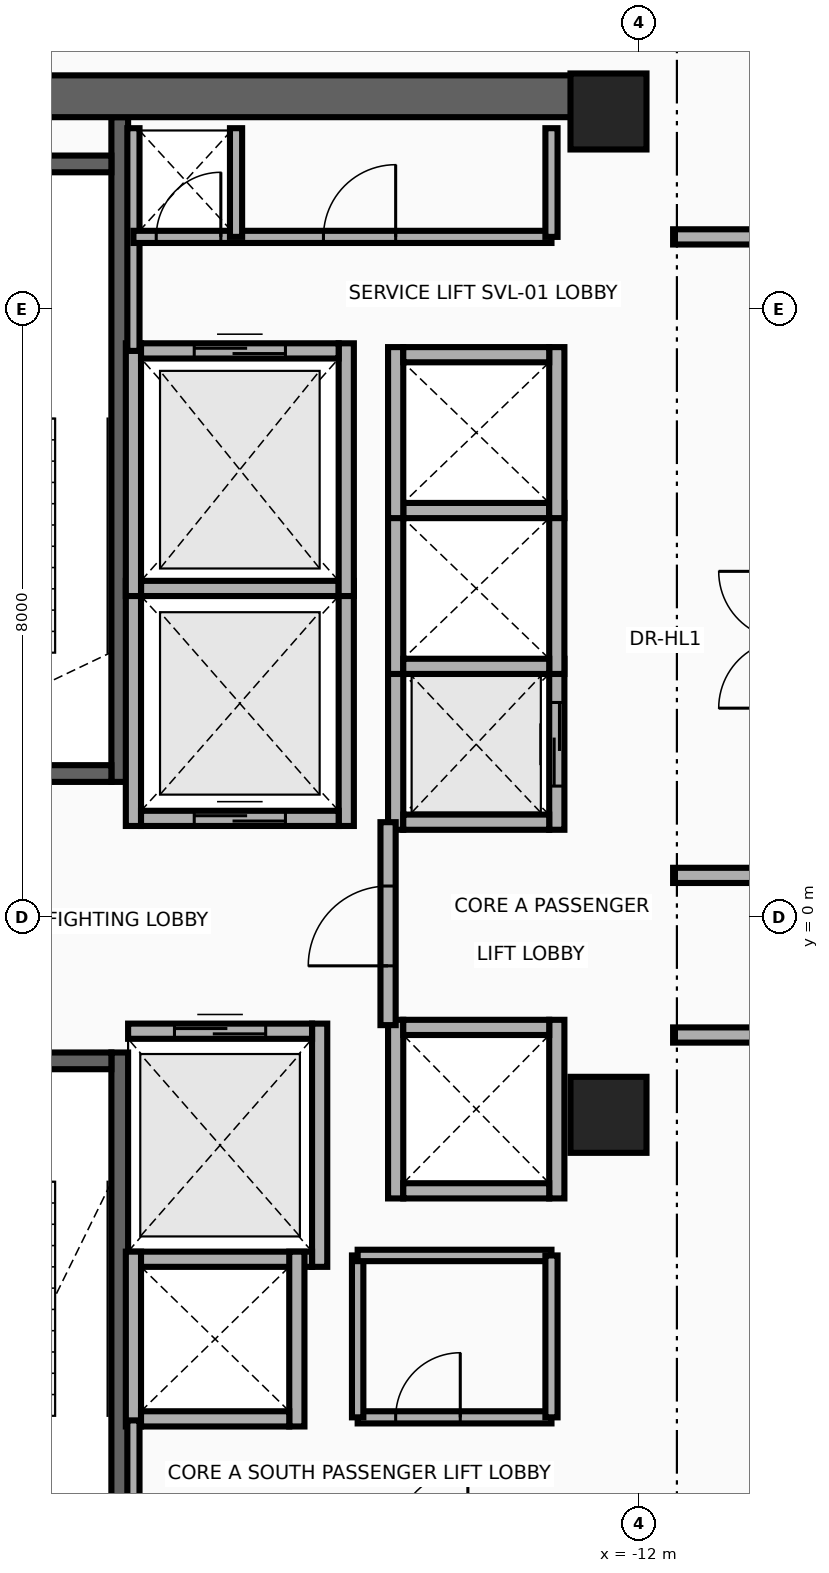
"""IFC4 building model, lengths in metres.
Left out: names, types, materials, properties, quantities, classifications, styles, units other than length and angle.
Written with IfcOpenShell. Run it as: python <this file> out.ifc"""

import sys

from ifc_helpers import new_model, si_unit, direction, frame, frame_2d, origin, origin_2d, place, context, subcontext, project, spatial, rectangle, extrude, source, transform, mapped, element, fill, save


model = new_model("IFC4")
c1 = context("Model", 3, precision=1e-05, world=origin(), true_north=direction((0.0, 1.0)))
c2 = subcontext(c1, "Body", "Model", "MODEL_VIEW")
j1 = project(units=[si_unit("LENGTHUNIT", "METRE"), si_unit("PLANEANGLEUNIT", "RADIAN")], contexts=[c1])
p1 = place(None, origin())
s1 = spatial("IfcSite", under=j1, at=p1, CompositionType="ELEMENT")
p2 = place(p1, origin())
s2 = spatial("IfcBuilding", under=s1, at=p2, CompositionType="ELEMENT")
p3 = place(p2, frame((0.0, 0.0, 172.3)))
s3 = spatial("IfcBuildingStorey", under=s2, at=p3, CompositionType="ELEMENT", Elevation=172.3)
p4 = place(p3, frame((-18.83, 1.78, 0.0), z_axis=(0.0, 0.0, 1.0), x_axis=(0.0, 1.0, 0.0)))
e1 = element("IfcWall", 1, at=p4, inside=s3, PredefinedType="SHEAR", context=c2, shape_type="SweptSolid", body=[
    extrude(rectangle(XDim=8.745, YDim=0.22, at=frame_2d((4.373, 0.0))), origin(), (0.0, 0.0, 1.0), 3.93),
])
p5 = place(p3, frame((-22.05, 1.89, 0.0), z_axis=(0.0, 0.0, 1.0), x_axis=(1.0, 0.0, 0.0)))
e2 = element("IfcWall", 2, at=p5, inside=s3, PredefinedType="SHEAR", context=c2, shape_type="SweptSolid", body=[
    extrude(rectangle(XDim=3.11, YDim=0.22, at=frame_2d((1.555, 0.0))), origin(), (0.0, 0.0, 1.0), 3.93),
])
p6 = place(p5, frame((1.0, 0.0, 0.0)))
e3 = element("IfcOpeningElement", 3, at=p6, cuts=e2, PredefinedType="OPENING", context=c2, shape_type="SweptSolid", body=[
    extrude(rectangle(XDim=1.1, YDim=2.15, at=frame_2d((0.55, 1.075))), frame((0.0, 0.125, 0.0), z_axis=(0.0, -1.0, 0.0), x_axis=(1.0, 0.0, 0.0)), (0.0, 0.0, 1.0), 0.25),
])
p7 = place(p3, frame((-22.05, 9.91, 0.0), z_axis=(0.0, 0.0, 1.0), x_axis=(1.0, 0.0, 0.0)))
e4 = element("IfcWall", 4, at=p7, inside=s3, PredefinedType="SHEAR", context=c2, shape_type="SweptSolid", body=[
    extrude(rectangle(XDim=3.11, YDim=0.22, at=frame_2d((1.555, 0.0))), origin(), (0.0, 0.0, 1.0), 3.93),
])
p8 = place(p3, frame((-18.83, -10.525, 0.0), z_axis=(0.0, 0.0, 1.0), x_axis=(0.0, 1.0, 0.0)))
e5 = element("IfcWall", 5, at=p8, inside=s3, PredefinedType="SHEAR", context=c2, shape_type="SweptSolid", body=[
    extrude(rectangle(XDim=8.745, YDim=0.22, at=frame_2d((4.373, 0.0))), origin(), (0.0, 0.0, 1.0), 3.93),
])
p9 = place(p3, frame((-22.05, -1.89, 0.0), z_axis=(0.0, 0.0, 1.0), x_axis=(1.0, 0.0, 0.0)))
e6 = element("IfcWall", 6, at=p9, inside=s3, PredefinedType="SHEAR", context=c2, shape_type="SweptSolid", body=[
    extrude(rectangle(XDim=3.11, YDim=0.22, at=frame_2d((1.555, 0.0))), origin(), (0.0, 0.0, 1.0), 3.93),
])
p10 = place(p9, frame((1.0, 0.0, 0.0)))
e7 = element("IfcOpeningElement", 7, at=p10, cuts=e6, PredefinedType="OPENING", context=c2, shape_type="SweptSolid", body=[
    extrude(rectangle(XDim=1.1, YDim=2.15, at=frame_2d((0.55, 1.075))), frame((0.0, 0.125, 0.0), z_axis=(0.0, -1.0, 0.0), x_axis=(1.0, 0.0, 0.0)), (0.0, 0.0, 1.0), 0.25),
])
p11 = place(p3, frame((-22.65, 10.8, 0.0), z_axis=(0.0, 0.0, 1.0), x_axis=(1.0, 0.0, 0.0)))
e8 = element("IfcWall", 8, at=p11, inside=s3, PredefinedType="SHEAR", context=c2, shape_type="SweptSolid", body=[
    extrude(rectangle(XDim=10.25, YDim=0.55, at=frame_2d((5.125, 0.0))), origin(), (0.0, 0.0, 1.0), 3.93),
])
m1 = source(origin(), c2, "Body", "SweptSolid", [
    extrude(rectangle(XDim=1.0, YDim=1.0, at=origin_2d()), origin(), (0.0, 0.0, 1.0), 4.25),
])
for number, where, z_axis, x_axis in (
    (9, (-12.4, -2.6, 0.0), (0.0, 0.0, 1.0), (1.0, 0.0, 0.0)),
    (10, (-12.4, 10.6, 0.0), (0.0, 0.0, 1.0), (1.0, 0.0, 0.0)),
):
    element("IfcColumn", number, at=place(p3, frame(where, z_axis=z_axis, x_axis=x_axis)), inside=s3, PredefinedType="COLUMN", context=c2, shape_type="MappedRepresentation", body=[
        mapped(m1, transform((0.0, 0.0, 0.0), x_axis=(1.0, 0.0, 0.0), y_axis=(0.0, 1.0, 0.0), z_axis=(0.0, 0.0, 1.0), scale=1.0)),
    ])
for number, where, z_axis, x_axis in (
    (11, (-18.65, 1.2, 0.0), (0.0, 0.0, 1.0), (0.0, 1.0, 0.0)),
    (12, (-15.85, 1.2, 0.0), (0.0, 0.0, 1.0), (0.0, 1.0, 0.0)),
):
    element("IfcWall", number, at=place(p3, frame(where, z_axis=z_axis, x_axis=x_axis)), inside=s3, PredefinedType="MOVABLE", context=c2, shape_type="SweptSolid", body=[
        extrude(rectangle(XDim=3.225, YDim=0.2, at=frame_2d((1.613, 0.0))), origin(), (0.0, 0.0, 1.0), 3.93),
    ])
p12 = place(p3, frame((-18.55, 1.3, 0.0), z_axis=(0.0, 0.0, 1.0), x_axis=(1.0, 0.0, 0.0)))
e13 = element("IfcWall", 13, at=p12, inside=s3, PredefinedType="MOVABLE", context=c2, shape_type="SweptSolid", body=[
    extrude(rectangle(XDim=2.6, YDim=0.2, at=frame_2d((1.3, 0.0))), origin(), (0.0, 0.0, 1.0), 3.93),
])
p13 = place(p12, frame((0.7, 0.0, 0.0)))
e14 = element("IfcOpeningElement", 14, at=p13, cuts=e13, PredefinedType="OPENING", context=c2, shape_type="SweptSolid", body=[
    extrude(rectangle(XDim=1.2, YDim=2.1, at=frame_2d((0.6, 1.05))), frame((0.0, 0.115, 0.0), z_axis=(0.0, -1.0, 0.0), x_axis=(1.0, 0.0, 0.0)), (0.0, 0.0, 1.0), 0.23),
])
p14 = place(p3, frame((-18.55, 4.325, 0.0), z_axis=(0.0, 0.0, 1.0), x_axis=(1.0, 0.0, 0.0)))
e15 = element("IfcWall", 15, at=p14, inside=s3, PredefinedType="MOVABLE", context=c2, shape_type="SweptSolid", body=[
    extrude(rectangle(XDim=2.6, YDim=0.2, at=frame_2d((1.3, 0.0))), origin(), (0.0, 0.0, 1.0), 3.93),
])
p15 = place(p3, frame((-16.2, -4.6, 0.0), z_axis=(0.0, 0.0, 1.0), x_axis=(0.0, 1.0, 0.0)))
e16 = element("IfcWall", 16, at=p15, inside=s3, PredefinedType="MOVABLE", context=c2, shape_type="SweptSolid", body=[
    extrude(rectangle(XDim=3.2, YDim=0.2, at=frame_2d((1.6, 0.0))), origin(), (0.0, 0.0, 1.0), 3.93),
])
p16 = place(p3, frame((-18.72, -4.5, 0.0), z_axis=(0.0, 0.0, 1.0), x_axis=(1.0, 0.0, 0.0)))
e17 = element("IfcWall", 17, at=p16, inside=s3, PredefinedType="MOVABLE", context=c2, shape_type="SweptSolid", body=[
    extrude(rectangle(XDim=2.42, YDim=0.2, at=frame_2d((1.21, 0.0))), origin(), (0.0, 0.0, 1.0), 3.93),
])
p17 = place(p3, frame((-18.72, -1.5, 0.0), z_axis=(0.0, 0.0, 1.0), x_axis=(1.0, 0.0, 0.0)))
e18 = element("IfcWall", 18, at=p17, inside=s3, PredefinedType="MOVABLE", context=c2, shape_type="SweptSolid", body=[
    extrude(rectangle(XDim=2.42, YDim=0.2, at=frame_2d((1.21, 0.0))), origin(), (0.0, 0.0, 1.0), 3.93),
])
p18 = place(p17, frame((0.61, 0.0, 0.0)))
e19 = element("IfcOpeningElement", 19, at=p18, cuts=e18, PredefinedType="OPENING", context=c2, shape_type="SweptSolid", body=[
    extrude(rectangle(XDim=1.2, YDim=2.1, at=frame_2d((0.6, 1.05))), frame((0.0, 0.115, 0.0), z_axis=(0.0, -1.0, 0.0), x_axis=(1.0, 0.0, 0.0)), (0.0, 0.0, 1.0), 0.23),
])
for number, where, z_axis, x_axis in (
    (20, (-18.65, 4.225, 0.0), (0.0, 0.0, 1.0), (0.0, 1.0, 0.0)),
    (21, (-15.85, 4.225, 0.0), (0.0, 0.0, 1.0), (0.0, 1.0, 0.0)),
):
    element("IfcWall", number, at=place(p3, frame(where, z_axis=z_axis, x_axis=x_axis)), inside=s3, PredefinedType="MOVABLE", context=c2, shape_type="SweptSolid", body=[
        extrude(rectangle(XDim=3.325, YDim=0.2, at=frame_2d((1.663, 0.0))), origin(), (0.0, 0.0, 1.0), 3.93),
    ])
p19 = place(p3, frame((-18.55, 7.45, 0.0), z_axis=(0.0, 0.0, 1.0), x_axis=(1.0, 0.0, 0.0)))
e22 = element("IfcWall", 22, at=p19, inside=s3, PredefinedType="MOVABLE", context=c2, shape_type="SweptSolid", body=[
    extrude(rectangle(XDim=2.6, YDim=0.2, at=frame_2d((1.3, 0.0))), origin(), (0.0, 0.0, 1.0), 3.93),
])
p20 = place(p19, frame((0.7, 0.0, 0.0)))
e23 = element("IfcOpeningElement", 23, at=p20, cuts=e22, PredefinedType="OPENING", context=c2, shape_type="SweptSolid", body=[
    extrude(rectangle(XDim=1.2, YDim=2.1, at=frame_2d((0.6, 1.05))), frame((0.0, 0.115, 0.0), z_axis=(0.0, -1.0, 0.0), x_axis=(1.0, 0.0, 0.0)), (0.0, 0.0, 1.0), 0.23),
])
p21 = place(p3, frame((-15.2, 1.15, 0.0), z_axis=(0.0, 0.0, 1.0), x_axis=(0.0, 1.0, 0.0)))
e24 = element("IfcWall", 24, at=p21, inside=s3, PredefinedType="MOVABLE", context=c2, shape_type="SweptSolid", body=[
    extrude(rectangle(XDim=2.25, YDim=0.2, at=frame_2d((1.125, 0.0))), origin(), (0.0, 0.0, 1.0), 3.93),
])
p22 = place(p3, frame((-13.08, 1.15, 0.0), z_axis=(0.0, 0.0, 1.0), x_axis=(0.0, 1.0, 0.0)))
e25 = element("IfcWall", 25, at=p22, inside=s3, PredefinedType="MOVABLE", context=c2, shape_type="SweptSolid", body=[
    extrude(rectangle(XDim=2.25, YDim=0.2, at=frame_2d((1.125, 0.0))), origin(), (0.0, 0.0, 1.0), 3.93),
])
p23 = place(p22, frame((0.575, 0.0, 0.0)))
e26 = element("IfcOpeningElement", 26, at=p23, cuts=e25, PredefinedType="OPENING", context=c2, shape_type="SweptSolid", body=[
    extrude(rectangle(XDim=1.1, YDim=2.1, at=frame_2d((0.55, 1.05))), frame((0.0, 0.115, 0.0), z_axis=(0.0, -1.0, 0.0), x_axis=(1.0, 0.0, 0.0)), (0.0, 0.0, 1.0), 0.23),
])
p24 = place(p3, frame((-15.1, 1.25, 0.0), z_axis=(0.0, 0.0, 1.0), x_axis=(1.0, 0.0, 0.0)))
e27 = element("IfcWall", 27, at=p24, inside=s3, PredefinedType="MOVABLE", context=c2, shape_type="SweptSolid", body=[
    extrude(rectangle(XDim=1.92, YDim=0.2, at=frame_2d((0.96, 0.0))), origin(), (0.0, 0.0, 1.0), 3.93),
])
for number, where, z_axis, x_axis in (
    (28, (-15.2, 3.2, 0.0), (0.0, 0.0, 1.0), (0.0, 1.0, 0.0)),
    (29, (-13.08, 3.2, 0.0), (0.0, 0.0, 1.0), (0.0, 1.0, 0.0)),
):
    element("IfcWall", number, at=place(p3, frame(where, z_axis=z_axis, x_axis=x_axis)), inside=s3, PredefinedType="MOVABLE", context=c2, shape_type="SweptSolid", body=[
        extrude(rectangle(XDim=2.25, YDim=0.2, at=frame_2d((1.125, 0.0))), origin(), (0.0, 0.0, 1.0), 3.93),
    ])
for number, where, z_axis, x_axis in (
    (30, (-15.1, 3.3, 0.0), (0.0, 0.0, 1.0), (1.0, 0.0, 0.0)),
    (31, (-15.1, 5.35, 0.0), (0.0, 0.0, 1.0), (1.0, 0.0, 0.0)),
):
    element("IfcWall", number, at=place(p3, frame(where, z_axis=z_axis, x_axis=x_axis)), inside=s3, PredefinedType="MOVABLE", context=c2, shape_type="SweptSolid", body=[
        extrude(rectangle(XDim=1.92, YDim=0.2, at=frame_2d((0.96, 0.0))), origin(), (0.0, 0.0, 1.0), 3.93),
    ])
for number, where, z_axis, x_axis in (
    (32, (-15.2, 5.25, 0.0), (0.0, 0.0, 1.0), (0.0, 1.0, 0.0)),
    (33, (-13.08, 5.25, 0.0), (0.0, 0.0, 1.0), (0.0, 1.0, 0.0)),
):
    element("IfcWall", number, at=place(p3, frame(where, z_axis=z_axis, x_axis=x_axis)), inside=s3, PredefinedType="MOVABLE", context=c2, shape_type="SweptSolid", body=[
        extrude(rectangle(XDim=2.25, YDim=0.2, at=frame_2d((1.125, 0.0))), origin(), (0.0, 0.0, 1.0), 3.93),
    ])
p25 = place(p3, frame((-15.1, 7.4, 0.0), z_axis=(0.0, 0.0, 1.0), x_axis=(1.0, 0.0, 0.0)))
e34 = element("IfcWall", 34, at=p25, inside=s3, PredefinedType="MOVABLE", context=c2, shape_type="SweptSolid", body=[
    extrude(rectangle(XDim=1.92, YDim=0.2, at=frame_2d((0.96, 0.0))), origin(), (0.0, 0.0, 1.0), 3.93),
])
for number, where, z_axis, x_axis in (
    (35, (-18.65, -6.7, 0.0), (0.0, 0.0, 1.0), (0.0, 1.0, 0.0)),
    (36, (-16.5, -6.7, 0.0), (0.0, 0.0, 1.0), (0.0, 1.0, 0.0)),
):
    element("IfcWall", number, at=place(p3, frame(where, z_axis=z_axis, x_axis=x_axis)), inside=s3, PredefinedType="MOVABLE", context=c2, shape_type="SweptSolid", body=[
        extrude(rectangle(XDim=2.3, YDim=0.2, at=frame_2d((1.15, 0.0))), origin(), (0.0, 0.0, 1.0), 3.93),
    ])
p26 = place(p3, frame((-18.55, -6.6, 0.0), z_axis=(0.0, 0.0, 1.0), x_axis=(1.0, 0.0, 0.0)))
e37 = element("IfcWall", 37, at=p26, inside=s3, PredefinedType="MOVABLE", context=c2, shape_type="SweptSolid", body=[
    extrude(rectangle(XDim=1.95, YDim=0.2, at=frame_2d((0.975, 0.0))), origin(), (0.0, 0.0, 1.0), 3.93),
])
for number, where, z_axis, x_axis in (
    (38, (-15.2, -3.7, 0.0), (0.0, 0.0, 1.0), (0.0, 1.0, 0.0)),
    (39, (-13.08, -3.7, 0.0), (0.0, 0.0, 1.0), (0.0, 1.0, 0.0)),
):
    element("IfcWall", number, at=place(p3, frame(where, z_axis=z_axis, x_axis=x_axis)), inside=s3, PredefinedType="MOVABLE", context=c2, shape_type="SweptSolid", body=[
        extrude(rectangle(XDim=2.35, YDim=0.2, at=frame_2d((1.175, 0.0))), origin(), (0.0, 0.0, 1.0), 3.93),
    ])
for number, where, z_axis, x_axis in (
    (40, (-15.1, -3.6, 0.0), (0.0, 0.0, 1.0), (1.0, 0.0, 0.0)),
    (41, (-15.1, -1.45, 0.0), (0.0, 0.0, 1.0), (1.0, 0.0, 0.0)),
):
    element("IfcWall", number, at=place(p3, frame(where, z_axis=z_axis, x_axis=x_axis)), inside=s3, PredefinedType="MOVABLE", context=c2, shape_type="SweptSolid", body=[
        extrude(rectangle(XDim=1.92, YDim=0.2, at=frame_2d((0.96, 0.0))), origin(), (0.0, 0.0, 1.0), 3.93),
    ])
p27 = place(p3, frame((-15.3, -1.42, 0.0), z_axis=(0.0, 0.0, 1.0), x_axis=(0.0, 1.0, 0.0)))
e42 = element("IfcWall", 42, at=p27, inside=s3, PredefinedType="PARTITIONING", context=c2, shape_type="SweptSolid", body=[
    extrude(rectangle(XDim=2.67, YDim=0.2, at=frame_2d((1.335, 0.0))), origin(), (0.0, 0.0, 1.0), 3.93),
])
p28 = place(p27, frame((0.78, 0.0, 0.0)))
e43 = element("IfcOpeningElement", 43, at=p28, cuts=e42, PredefinedType="OPENING", context=c2, shape_type="SweptSolid", body=[
    extrude(rectangle(XDim=1.05, YDim=2.15, at=frame_2d((0.525, 1.075))), frame((0.0, 0.115, 0.0), z_axis=(0.0, -1.0, 0.0), x_axis=(1.0, 0.0, 0.0)), (0.0, 0.0, 1.0), 0.23),
])
p29 = place(p3, frame((-18.65, 7.45, 0.0), z_axis=(0.0, 0.0, 1.0), x_axis=(0.0, 1.0, 0.0)))
e44 = element("IfcWall", 44, at=p29, inside=s3, PredefinedType="PARTITIONING", context=c2, shape_type="SweptSolid", body=[
    extrude(rectangle(XDim=2.93, YDim=0.16, at=frame_2d((1.465, 0.0))), origin(), (0.0, 0.0, 1.0), 3.93),
])
p30 = place(p3, frame((-18.65, -8.18, 0.0), z_axis=(0.0, 0.0, 1.0), x_axis=(0.0, 1.0, 0.0)))
e45 = element("IfcWall", 45, at=p30, inside=s3, PredefinedType="PARTITIONING", context=c2, shape_type="SweptSolid", body=[
    extrude(rectangle(XDim=1.56, YDim=0.16, at=frame_2d((0.78, 0.0))), origin(), (0.0, 0.0, 1.0), 3.93),
])
p31 = place(p3, frame((-18.65, 8.95, 0.0), z_axis=(0.0, 0.0, 1.0), x_axis=(1.0, 0.0, 0.0)))
e46 = element("IfcWall", 46, at=p31, inside=s3, PredefinedType="PARTITIONING", context=c2, shape_type="SweptSolid", body=[
    extrude(rectangle(XDim=5.5, YDim=0.16, at=frame_2d((2.75, 0.0))), origin(), (0.0, 0.0, 1.0), 3.93),
])
p32 = place(p31, frame((0.3, 0.0, 0.0)))
e47 = element("IfcOpeningElement", 47, at=p32, cuts=e46, PredefinedType="OPENING", context=c2, shape_type="SweptSolid", body=[
    extrude(rectangle(XDim=0.85, YDim=2.05, at=frame_2d((0.425, 1.025))), frame((0.0, 0.095, 0.0), z_axis=(0.0, -1.0, 0.0), x_axis=(1.0, 0.0, 0.0)), (0.0, 0.0, 1.0), 0.19),
])
p33 = place(p31, frame((2.5, 0.0, 0.0)))
e48 = element("IfcOpeningElement", 48, at=p33, cuts=e46, PredefinedType="OPENING", context=c2, shape_type="SweptSolid", body=[
    extrude(rectangle(XDim=0.95, YDim=2.15, at=frame_2d((0.475, 1.075))), frame((0.0, 0.095, 0.0), z_axis=(0.0, -1.0, 0.0), x_axis=(1.0, 0.0, 0.0)), (0.0, 0.0, 1.0), 0.19),
])
for number, where, z_axis, x_axis in (
    (49, (-13.15, 8.95, 0.0), (0.0, 0.0, 1.0), (0.0, 1.0, 0.0)),
    (50, (-17.3, 8.95, 0.0), (0.0, 0.0, 1.0), (0.0, 1.0, 0.0)),
):
    element("IfcWall", number, at=place(p3, frame(where, z_axis=z_axis, x_axis=x_axis)), inside=s3, PredefinedType="PARTITIONING", context=c2, shape_type="SweptSolid", body=[
        extrude(rectangle(XDim=1.43, YDim=0.16, at=frame_2d((0.715, 0.0))), origin(), (0.0, 0.0, 1.0), 3.93),
    ])
p34 = place(p3, frame((-15.7, -6.58, 0.0), z_axis=(0.0, 0.0, 1.0), x_axis=(1.0, 0.0, 0.0)))
e51 = element("IfcWall", 51, at=p34, inside=s3, PredefinedType="PARTITIONING", context=c2, shape_type="SweptSolid", body=[
    extrude(rectangle(XDim=2.55, YDim=0.16, at=frame_2d((1.275, 0.0))), origin(), (0.0, 0.0, 1.0), 3.93),
])
p35 = place(p34, frame((0.5, 0.0, 0.0)))
e52 = element("IfcOpeningElement", 52, at=p35, cuts=e51, PredefinedType="OPENING", context=c2, shape_type="SweptSolid", body=[
    extrude(rectangle(XDim=0.85, YDim=2.05, at=frame_2d((0.425, 1.025))), frame((0.0, 0.095, 0.0), z_axis=(0.0, -1.0, 0.0), x_axis=(1.0, 0.0, 0.0)), (0.0, 0.0, 1.0), 0.19),
])
p36 = place(p3, frame((-15.7, -6.58, 0.0), z_axis=(0.0, 0.0, 1.0), x_axis=(0.0, 1.0, 0.0)))
e53 = element("IfcWall", 53, at=p36, inside=s3, PredefinedType="PARTITIONING", context=c2, shape_type="SweptSolid", body=[
    extrude(rectangle(XDim=2.13, YDim=0.15, at=frame_2d((1.065, 0.0))), origin(), (0.0, 0.0, 1.0), 3.93),
])
p37 = place(p3, frame((-15.7, -4.45, 0.0), z_axis=(0.0, 0.0, 1.0), x_axis=(1.0, 0.0, 0.0)))
e54 = element("IfcWall", 54, at=p37, inside=s3, PredefinedType="PARTITIONING", context=c2, shape_type="SweptSolid", body=[
    extrude(rectangle(XDim=2.55, YDim=0.15, at=frame_2d((1.275, 0.0))), origin(), (0.0, 0.0, 1.0), 3.93),
])
p38 = place(p3, frame((-13.15, -6.58, 0.0), z_axis=(0.0, 0.0, 1.0), x_axis=(0.0, 1.0, 0.0)))
e55 = element("IfcWall", 55, at=p38, inside=s3, PredefinedType="PARTITIONING", context=c2, shape_type="SweptSolid", body=[
    extrude(rectangle(XDim=2.13, YDim=0.16, at=frame_2d((1.065, 0.0))), origin(), (0.0, 0.0, 1.0), 3.93),
])
p39 = place(p3, frame((-11.55, 0.55, 0.0), z_axis=(0.0, 0.0, 1.0), x_axis=(1.0, 0.0, 0.0)))
e56 = element("IfcWall", 56, at=p39, inside=s3, PredefinedType="PARTITIONING", context=c2, shape_type="SweptSolid", body=[
    extrude(rectangle(XDim=24.97, YDim=0.2, at=frame_2d((12.485, 0.0))), origin(), (0.0, 0.0, 1.0), 2.715),
])
p40 = place(p3, frame((-11.55, -1.55, 0.0), z_axis=(0.0, 0.0, 1.0), x_axis=(1.0, 0.0, 0.0)))
e57 = element("IfcWall", 57, at=p40, inside=s3, PredefinedType="PARTITIONING", context=c2, shape_type="SweptSolid", body=[
    extrude(rectangle(XDim=1.5, YDim=0.2, at=frame_2d((0.75, 0.0))), origin(), (0.0, 0.0, 1.0), 2.715),
])
p41 = place(p3, frame((-11.55, 8.95, 0.0), z_axis=(0.0, 0.0, 1.0), x_axis=(1.0, 0.0, 0.0)))
e58 = element("IfcWall", 58, at=p41, inside=s3, PredefinedType="PARTITIONING", context=c2, shape_type="SweptSolid", body=[
    extrude(rectangle(XDim=17.35, YDim=0.2, at=frame_2d((8.675, 0.0))), origin(), (0.0, 0.0, 1.0), 2.715),
])
p42 = place(p13, origin())
e59 = element("IfcDoor", 59, at=p42, inside=s3, OperationType="DOUBLE_DOOR_SLIDING", PredefinedType="DOOR", context=c2, shape_type="SweptSolid", body=[
    extrude(rectangle(XDim=1.2, YDim=2.1, at=frame_2d((0.6, 1.05))), frame((0.0, 0.025, 0.0), z_axis=(0.0, -1.0, 0.0), x_axis=(1.0, 0.0, 0.0)), (0.0, 0.0, 1.0), 0.05),
])
fill(e14, e59)
p43 = place(p18, origin())
e60 = element("IfcDoor", 60, at=p43, inside=s3, OperationType="DOUBLE_DOOR_SLIDING", PredefinedType="DOOR", context=c2, shape_type="SweptSolid", body=[
    extrude(rectangle(XDim=1.2, YDim=2.1, at=frame_2d((0.6, 1.05))), frame((0.0, 0.025, 0.0), z_axis=(0.0, -1.0, 0.0), x_axis=(1.0, 0.0, 0.0)), (0.0, 0.0, 1.0), 0.05),
])
fill(e19, e60)
p44 = place(p20, origin())
e61 = element("IfcDoor", 61, at=p44, inside=s3, OperationType="DOUBLE_DOOR_SLIDING", PredefinedType="DOOR", context=c2, shape_type="SweptSolid", body=[
    extrude(rectangle(XDim=1.2, YDim=2.1, at=frame_2d((0.6, 1.05))), frame((0.0, 0.025, 0.0), z_axis=(0.0, -1.0, 0.0), x_axis=(1.0, 0.0, 0.0)), (0.0, 0.0, 1.0), 0.05),
])
fill(e23, e61)
p45 = place(p23, origin())
e62 = element("IfcDoor", 62, at=p45, inside=s3, OperationType="DOUBLE_DOOR_SLIDING", PredefinedType="DOOR", context=c2, shape_type="SweptSolid", body=[
    extrude(rectangle(XDim=1.1, YDim=2.1, at=frame_2d((0.55, 1.05))), frame((0.0, 0.025, 0.0), z_axis=(0.0, -1.0, 0.0), x_axis=(1.0, 0.0, 0.0)), (0.0, 0.0, 1.0), 0.05),
])
fill(e26, e62)
p46 = place(p28, origin())
e63 = element("IfcDoor", 63, at=p46, inside=s3, OperationType="SINGLE_SWING_RIGHT", PredefinedType="DOOR", context=c2, shape_type="SweptSolid", body=[
    extrude(rectangle(XDim=1.05, YDim=2.15, at=frame_2d((0.525, 1.075))), frame((0.0, 0.025, 0.0), z_axis=(0.0, -1.0, 0.0), x_axis=(1.0, 0.0, 0.0)), (0.0, 0.0, 1.0), 0.05),
])
fill(e43, e63)
p47 = place(p32, origin())
e64 = element("IfcDoor", 64, at=p47, inside=s3, OperationType="SINGLE_SWING_LEFT", PredefinedType="DOOR", context=c2, shape_type="SweptSolid", body=[
    extrude(rectangle(XDim=0.85, YDim=2.05, at=frame_2d((0.425, 1.025))), frame((0.0, 0.025, 0.0), z_axis=(0.0, -1.0, 0.0), x_axis=(1.0, 0.0, 0.0)), (0.0, 0.0, 1.0), 0.05),
])
fill(e47, e64)
p48 = place(p33, origin())
e65 = element("IfcDoor", 65, at=p48, inside=s3, OperationType="SINGLE_SWING_RIGHT", PredefinedType="DOOR", context=c2, shape_type="SweptSolid", body=[
    extrude(rectangle(XDim=0.95, YDim=2.15, at=frame_2d((0.475, 1.075))), frame((0.0, 0.025, 0.0), z_axis=(0.0, -1.0, 0.0), x_axis=(1.0, 0.0, 0.0)), (0.0, 0.0, 1.0), 0.05),
])
fill(e48, e65)
p49 = place(p35, origin())
e66 = element("IfcDoor", 66, at=p49, inside=s3, OperationType="SINGLE_SWING_RIGHT", PredefinedType="DOOR", context=c2, shape_type="SweptSolid", body=[
    extrude(rectangle(XDim=0.85, YDim=2.05, at=frame_2d((0.425, 1.025))), frame((0.0, 0.025, 0.0), z_axis=(0.0, -1.0, 0.0), x_axis=(1.0, 0.0, 0.0)), (0.0, 0.0, 1.0), 0.05),
])
fill(e52, e66)
save(model, sys.argv[1])
